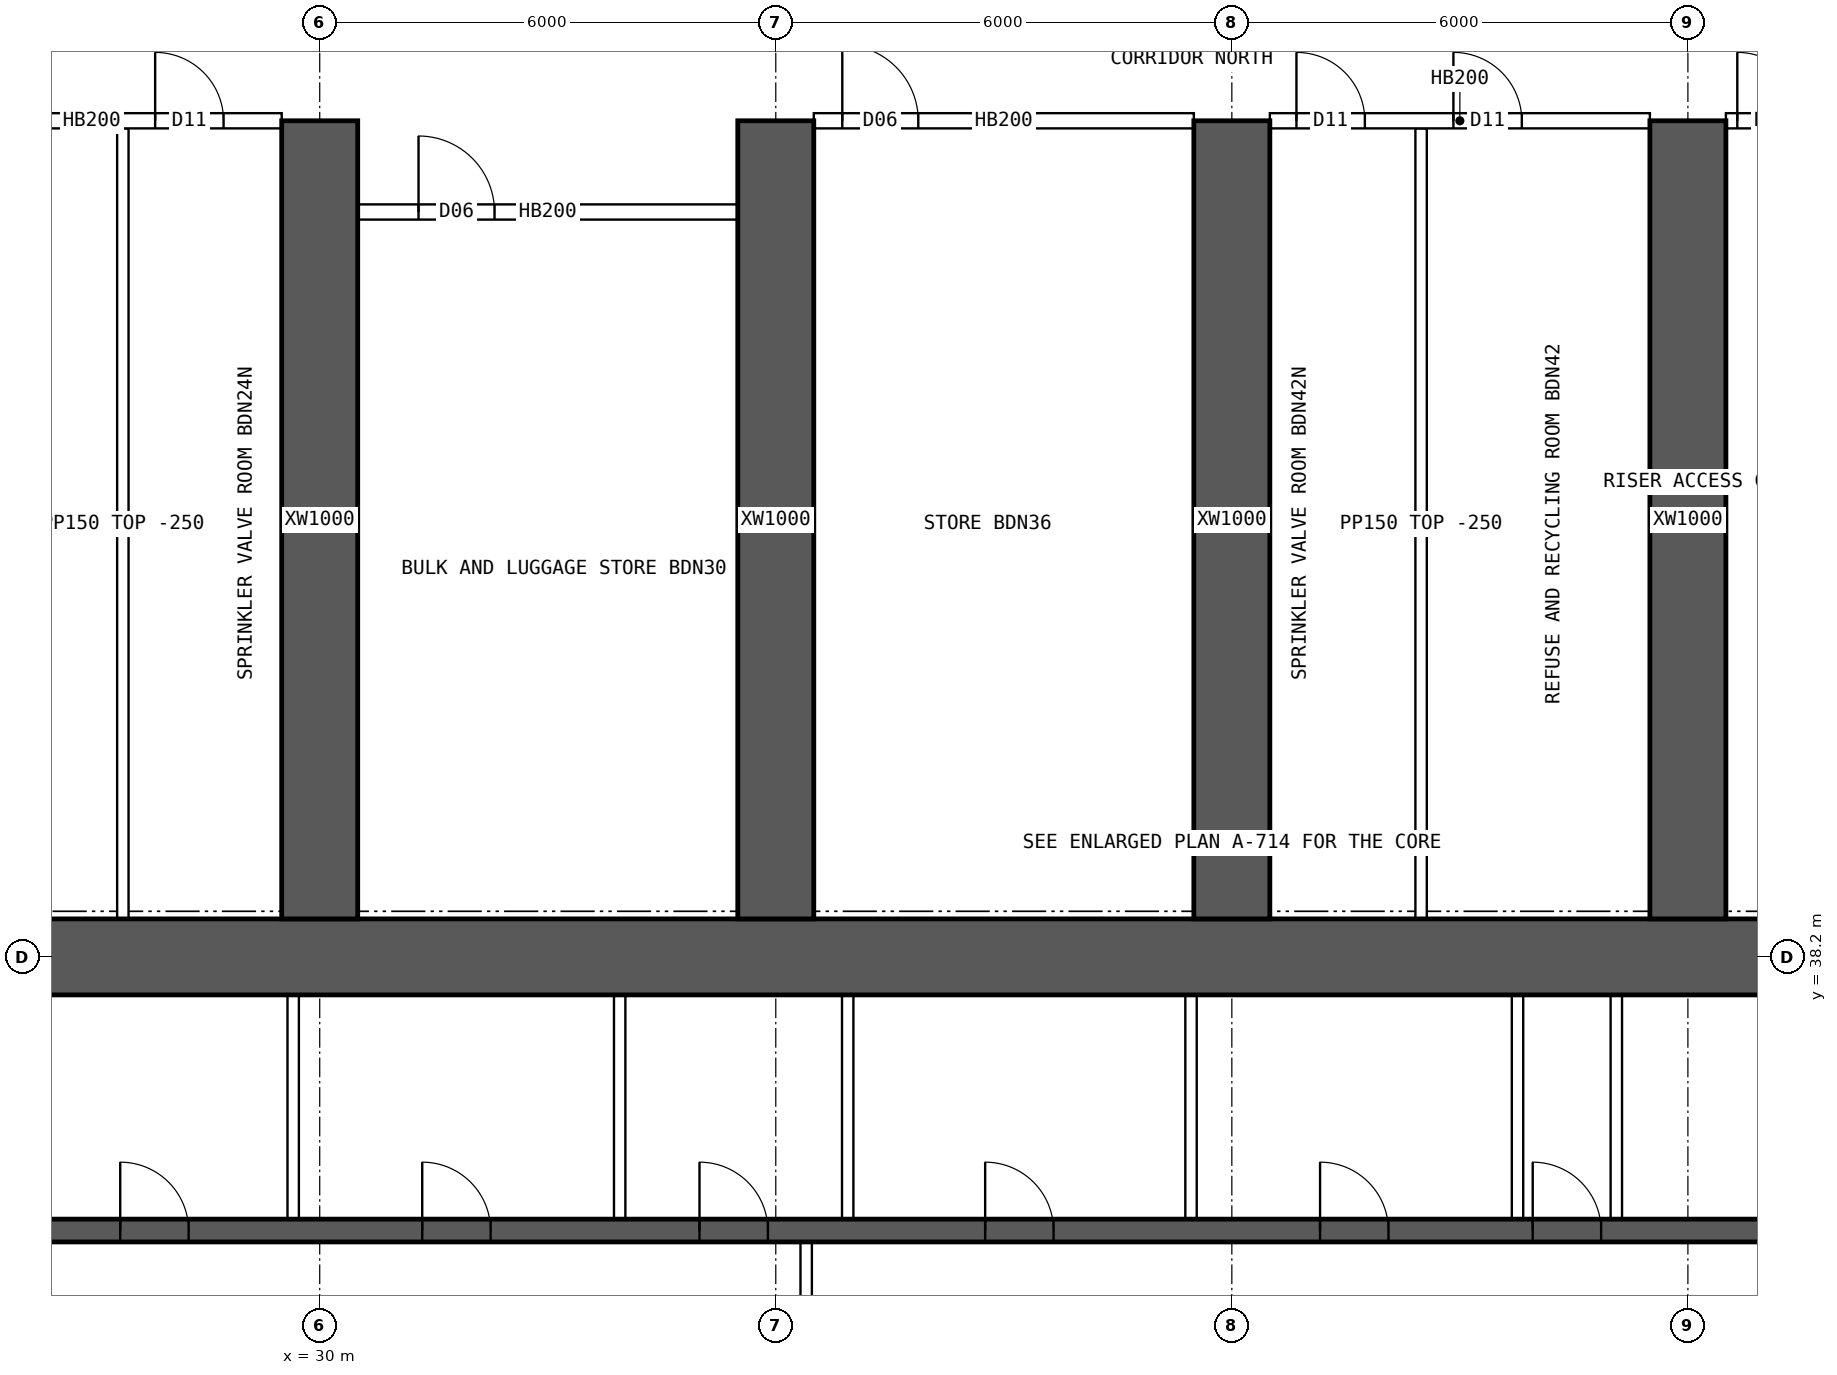
"""IFC4 building model, lengths in metres.
Left out: names, types, materials, properties, quantities, classifications, styles, units other than length and angle.
Written with IfcOpenShell. Run it as: python <this file> out.ifc"""

import sys

from ifc_helpers import new_model, si_unit, direction, frame, frame_2d, origin, place, context, subcontext, project, spatial, rectangle, extrude, element, fill, save


model = new_model("IFC4")
c1 = context("Model", 3, precision=1e-05, world=origin(), true_north=direction((0.0, 1.0)))
c2 = subcontext(c1, "Body", "Model", "MODEL_VIEW")
j1 = project(units=[si_unit("LENGTHUNIT", "METRE"), si_unit("PLANEANGLEUNIT", "RADIAN")], contexts=[c1])
p1 = place(None, origin())
s1 = spatial("IfcSite", under=j1, at=p1, CompositionType="ELEMENT")
p2 = place(p1, origin())
s2 = spatial("IfcBuilding", under=s1, at=p2, CompositionType="ELEMENT")
p3 = place(p2, frame((0.0, 0.0, 46.45)))
s3 = spatial("IfcBuildingStorey", under=s2, at=p3, CompositionType="ELEMENT", Elevation=46.45)
p4 = place(p3, frame((18.0, 38.2, 0.0), z_axis=(0.0, 0.0, 1.0), x_axis=(1.0, 0.0, 0.0)))
e1 = element("IfcWall", 1, at=p4, inside=s3, PredefinedType="SHEAR", context=c2, shape_type="SweptSolid", body=[
    extrude(rectangle(XDim=48.0, YDim=1.0, at=frame_2d((24.0, 0.0))), origin(), (0.0, 0.0, 1.0), 3.75),
])
p5 = place(p3, frame((18.5, 34.6, 0.0), z_axis=(0.0, 0.0, 1.0), x_axis=(1.0, 0.0, 0.0)))
e2 = element("IfcWall", 2, at=p5, inside=s3, PredefinedType="SHEAR", context=c2, shape_type="SweptSolid", body=[
    extrude(rectangle(XDim=47.0, YDim=0.3, at=frame_2d((23.5, 0.0))), origin(), (0.0, 0.0, 1.0), 3.75),
])
p6 = place(p5, frame((0.9, 0.0, 0.0)))
e3 = element("IfcOpeningElement", 3, at=p6, cuts=e2, PredefinedType="OPENING", context=c2, shape_type="SweptSolid", body=[
    extrude(rectangle(XDim=1.1, YDim=2.1, at=frame_2d((0.55, 1.05))), frame((0.0, 0.16, 0.0), z_axis=(0.0, -1.0, 0.0), x_axis=(1.0, 0.0, 0.0)), (0.0, 0.0, 1.0), 0.32),
])
p7 = place(p5, frame((45.0, 0.0, 0.0)))
e4 = element("IfcOpeningElement", 4, at=p7, cuts=e2, PredefinedType="OPENING", context=c2, shape_type="SweptSolid", body=[
    extrude(rectangle(XDim=1.1, YDim=2.1, at=frame_2d((0.55, 1.05))), frame((0.0, 0.16, 0.0), z_axis=(0.0, -1.0, 0.0), x_axis=(1.0, 0.0, 0.0)), (0.0, 0.0, 1.0), 0.32),
])
p8 = place(p5, frame((4.1, 0.0, 0.0)))
e5 = element("IfcOpeningElement", 5, at=p8, cuts=e2, PredefinedType="OPENING", context=c2, shape_type="SweptSolid", body=[
    extrude(rectangle(XDim=0.9, YDim=2.1, at=frame_2d((0.45, 1.05))), frame((0.0, 0.16, 0.0), z_axis=(0.0, -1.0, 0.0), x_axis=(1.0, 0.0, 0.0)), (0.0, 0.0, 1.0), 0.32),
])
p9 = place(p5, frame((42.0, 0.0, 0.0)))
e6 = element("IfcOpeningElement", 6, at=p9, cuts=e2, PredefinedType="OPENING", context=c2, shape_type="SweptSolid", body=[
    extrude(rectangle(XDim=0.9, YDim=2.1, at=frame_2d((0.45, 1.05))), frame((0.0, 0.16, 0.0), z_axis=(0.0, -1.0, 0.0), x_axis=(1.0, 0.0, 0.0)), (0.0, 0.0, 1.0), 0.32),
])
p10 = place(p5, frame((8.875, 0.0, 0.0)))
e7 = element("IfcOpeningElement", 7, at=p10, cuts=e2, PredefinedType="OPENING", context=c2, shape_type="SweptSolid", body=[
    extrude(rectangle(XDim=0.9, YDim=2.1, at=frame_2d((0.45, 1.05))), frame((0.0, 0.16, 0.0), z_axis=(0.0, -1.0, 0.0), x_axis=(1.0, 0.0, 0.0)), (0.0, 0.0, 1.0), 0.32),
])
p11 = place(p5, frame((12.849, 0.0, 0.0)))
e8 = element("IfcOpeningElement", 8, at=p11, cuts=e2, PredefinedType="OPENING", context=c2, shape_type="SweptSolid", body=[
    extrude(rectangle(XDim=0.9, YDim=2.1, at=frame_2d((0.45, 1.05))), frame((0.0, 0.16, 0.0), z_axis=(0.0, -1.0, 0.0), x_axis=(1.0, 0.0, 0.0)), (0.0, 0.0, 1.0), 0.32),
])
p12 = place(p5, frame((16.496, 0.0, 0.0)))
e9 = element("IfcOpeningElement", 9, at=p12, cuts=e2, PredefinedType="OPENING", context=c2, shape_type="SweptSolid", body=[
    extrude(rectangle(XDim=0.9, YDim=2.1, at=frame_2d((0.45, 1.05))), frame((0.0, 0.16, 0.0), z_axis=(0.0, -1.0, 0.0), x_axis=(1.0, 0.0, 0.0)), (0.0, 0.0, 1.0), 0.32),
])
p13 = place(p5, frame((20.255, 0.0, 0.0)))
e10 = element("IfcOpeningElement", 10, at=p13, cuts=e2, PredefinedType="OPENING", context=c2, shape_type="SweptSolid", body=[
    extrude(rectangle(XDim=0.9, YDim=2.1, at=frame_2d((0.45, 1.05))), frame((0.0, 0.16, 0.0), z_axis=(0.0, -1.0, 0.0), x_axis=(1.0, 0.0, 0.0)), (0.0, 0.0, 1.0), 0.32),
])
p14 = place(p5, frame((24.661, 0.0, 0.0)))
e11 = element("IfcOpeningElement", 11, at=p14, cuts=e2, PredefinedType="OPENING", context=c2, shape_type="SweptSolid", body=[
    extrude(rectangle(XDim=0.9, YDim=2.1, at=frame_2d((0.45, 1.05))), frame((0.0, 0.16, 0.0), z_axis=(0.0, -1.0, 0.0), x_axis=(1.0, 0.0, 0.0)), (0.0, 0.0, 1.0), 0.32),
])
p15 = place(p5, frame((27.458, 0.0, 0.0)))
e12 = element("IfcOpeningElement", 12, at=p15, cuts=e2, PredefinedType="OPENING", context=c2, shape_type="SweptSolid", body=[
    extrude(rectangle(XDim=0.9, YDim=2.1, at=frame_2d((0.45, 1.05))), frame((0.0, 0.16, 0.0), z_axis=(0.0, -1.0, 0.0), x_axis=(1.0, 0.0, 0.0)), (0.0, 0.0, 1.0), 0.32),
])
p16 = place(p5, frame((30.641, 0.0, 0.0)))
e13 = element("IfcOpeningElement", 13, at=p16, cuts=e2, PredefinedType="OPENING", context=c2, shape_type="SweptSolid", body=[
    extrude(rectangle(XDim=0.9, YDim=2.1, at=frame_2d((0.45, 1.05))), frame((0.0, 0.16, 0.0), z_axis=(0.0, -1.0, 0.0), x_axis=(1.0, 0.0, 0.0)), (0.0, 0.0, 1.0), 0.32),
])
p17 = place(p5, frame((34.592, 0.0, 0.0)))
e14 = element("IfcOpeningElement", 14, at=p17, cuts=e2, PredefinedType="OPENING", context=c2, shape_type="SweptSolid", body=[
    extrude(rectangle(XDim=0.9, YDim=2.1, at=frame_2d((0.45, 1.05))), frame((0.0, 0.16, 0.0), z_axis=(0.0, -1.0, 0.0), x_axis=(1.0, 0.0, 0.0)), (0.0, 0.0, 1.0), 0.32),
])
p18 = place(p5, frame((37.53, 0.0, 0.0)))
e15 = element("IfcOpeningElement", 15, at=p18, cuts=e2, PredefinedType="OPENING", context=c2, shape_type="SweptSolid", body=[
    extrude(rectangle(XDim=0.9, YDim=2.1, at=frame_2d((0.45, 1.05))), frame((0.0, 0.16, 0.0), z_axis=(0.0, -1.0, 0.0), x_axis=(1.0, 0.0, 0.0)), (0.0, 0.0, 1.0), 0.32),
])
for number, where, z_axis, x_axis in (
    (16, (30.0, 38.7, 0.0), (0.0, 0.0, 1.0), (0.0, 1.0, 0.0)),
    (17, (36.0, 38.7, 0.0), (0.0, 0.0, 1.0), (0.0, 1.0, 0.0)),
    (18, (42.0, 38.7, 0.0), (0.0, 0.0, 1.0), (0.0, 1.0, 0.0)),
    (19, (48.0, 38.7, 0.0), (0.0, 0.0, 1.0), (0.0, 1.0, 0.0)),
):
    element("IfcWall", number, at=place(p3, frame(where, z_axis=z_axis, x_axis=x_axis)), inside=s3, PredefinedType="SHEAR", context=c2, shape_type="SweptSolid", body=[
        extrude(rectangle(XDim=10.5, YDim=1.0, at=frame_2d((5.25, 0.0))), origin(), (0.0, 0.0, 1.0), 3.75),
    ])
p19 = place(p3, frame((36.4, 30.55, 0.0), z_axis=(0.0, 0.0, 1.0), x_axis=(0.0, 1.0, 0.0)))
e20 = element("IfcWall", 20, at=p19, inside=s3, PredefinedType="SOLIDWALL", context=c2, shape_type="SweptSolid", body=[
    extrude(rectangle(XDim=3.9, YDim=0.15, at=frame_2d((1.95, 0.0))), origin(), (0.0, 0.0, 1.0), 3.5),
])
p20 = place(p19, frame((1.15, 0.0, 0.0)))
e21 = element("IfcOpeningElement", 21, at=p20, cuts=e20, PredefinedType="OPENING", context=c2, shape_type="SweptSolid", body=[
    extrude(rectangle(XDim=1.6, YDim=2.1, at=frame_2d((0.8, 1.05))), frame((0.0, 0.085, 0.0), z_axis=(0.0, -1.0, 0.0), x_axis=(1.0, 0.0, 0.0)), (0.0, 0.0, 1.0), 0.17),
])
for number, where, z_axis, x_axis in (
    (22, (29.651, 34.75, 0.0), (0.0, 0.0, 1.0), (0.0, 1.0, 0.0)),
    (23, (33.946, 34.75, 0.0), (0.0, 0.0, 1.0), (0.0, 1.0, 0.0)),
    (24, (36.946, 34.75, 0.0), (0.0, 0.0, 1.0), (0.0, 1.0, 0.0)),
    (25, (41.463, 34.75, 0.0), (0.0, 0.0, 1.0), (0.0, 1.0, 0.0)),
    (26, (45.758, 34.75, 0.0), (0.0, 0.0, 1.0), (0.0, 1.0, 0.0)),
    (27, (47.058, 34.75, 0.0), (0.0, 0.0, 1.0), (0.0, 1.0, 0.0)),
):
    element("IfcWall", number, at=place(p3, frame(where, z_axis=z_axis, x_axis=x_axis)), inside=s3, PredefinedType="SOLIDWALL", context=c2, shape_type="SweptSolid", body=[
        extrude(rectangle(XDim=2.95, YDim=0.15, at=frame_2d((1.475, 0.0))), origin(), (0.0, 0.0, 1.0), 3.5),
    ])
p21 = place(p3, frame((24.5, 49.2, 0.0), z_axis=(0.0, 0.0, 1.0), x_axis=(1.0, 0.0, 0.0)))
e28 = element("IfcWall", 28, at=p21, inside=s3, PredefinedType="SOLIDWALL", context=c2, shape_type="SweptSolid", body=[
    extrude(rectangle(XDim=5.0, YDim=0.2, at=frame_2d((2.5, 0.0))), origin(), (0.0, 0.0, 1.0), 3.5),
])
p22 = place(p21, frame((0.15, 0.0, 0.0)))
e29 = element("IfcOpeningElement", 29, at=p22, cuts=e28, PredefinedType="OPENING", context=c2, shape_type="SweptSolid", body=[
    extrude(rectangle(XDim=0.9, YDim=2.1, at=frame_2d((0.45, 1.05))), frame((0.0, 0.11, 0.0), z_axis=(0.0, -1.0, 0.0), x_axis=(1.0, 0.0, 0.0)), (0.0, 0.0, 1.0), 0.22),
])
p23 = place(p21, frame((3.335, 0.0, 0.0)))
e30 = element("IfcOpeningElement", 30, at=p23, cuts=e28, PredefinedType="OPENING", context=c2, shape_type="SweptSolid", body=[
    extrude(rectangle(XDim=0.9, YDim=2.1, at=frame_2d((0.45, 1.05))), frame((0.0, 0.11, 0.0), z_axis=(0.0, -1.0, 0.0), x_axis=(1.0, 0.0, 0.0)), (0.0, 0.0, 1.0), 0.22),
])
p24 = place(p3, frame((36.5, 49.2, 0.0), z_axis=(0.0, 0.0, 1.0), x_axis=(1.0, 0.0, 0.0)))
e31 = element("IfcWall", 31, at=p24, inside=s3, PredefinedType="SOLIDWALL", context=c2, shape_type="SweptSolid", body=[
    extrude(rectangle(XDim=5.0, YDim=0.2, at=frame_2d((2.5, 0.0))), origin(), (0.0, 0.0, 1.0), 3.5),
])
p25 = place(p24, frame((0.375, 0.0, 0.0)))
e32 = element("IfcOpeningElement", 32, at=p25, cuts=e31, PredefinedType="OPENING", context=c2, shape_type="SweptSolid", body=[
    extrude(rectangle(XDim=1.0, YDim=2.1, at=frame_2d((0.5, 1.05))), frame((0.0, 0.11, 0.0), z_axis=(0.0, -1.0, 0.0), x_axis=(1.0, 0.0, 0.0)), (0.0, 0.0, 1.0), 0.22),
])
p26 = place(p3, frame((42.5, 49.2, 0.0), z_axis=(0.0, 0.0, 1.0), x_axis=(1.0, 0.0, 0.0)))
e33 = element("IfcWall", 33, at=p26, inside=s3, PredefinedType="SOLIDWALL", context=c2, shape_type="SweptSolid", body=[
    extrude(rectangle(XDim=5.0, YDim=0.2, at=frame_2d((2.5, 0.0))), origin(), (0.0, 0.0, 1.0), 3.5),
])
p27 = place(p26, frame((0.35, 0.0, 0.0)))
e34 = element("IfcOpeningElement", 34, at=p27, cuts=e33, PredefinedType="OPENING", context=c2, shape_type="SweptSolid", body=[
    extrude(rectangle(XDim=0.9, YDim=2.1, at=frame_2d((0.45, 1.05))), frame((0.0, 0.11, 0.0), z_axis=(0.0, -1.0, 0.0), x_axis=(1.0, 0.0, 0.0)), (0.0, 0.0, 1.0), 0.22),
])
p28 = place(p26, frame((2.415, 0.0, 0.0)))
e35 = element("IfcOpeningElement", 35, at=p28, cuts=e33, PredefinedType="OPENING", context=c2, shape_type="SweptSolid", body=[
    extrude(rectangle(XDim=0.9, YDim=2.1, at=frame_2d((0.45, 1.05))), frame((0.0, 0.11, 0.0), z_axis=(0.0, -1.0, 0.0), x_axis=(1.0, 0.0, 0.0)), (0.0, 0.0, 1.0), 0.22),
])
p29 = place(p3, frame((48.5, 49.2, 0.0), z_axis=(0.0, 0.0, 1.0), x_axis=(1.0, 0.0, 0.0)))
e36 = element("IfcWall", 36, at=p29, inside=s3, PredefinedType="SOLIDWALL", context=c2, shape_type="SweptSolid", body=[
    extrude(rectangle(XDim=5.0, YDim=0.2, at=frame_2d((2.5, 0.0))), origin(), (0.0, 0.0, 1.0), 3.5),
])
p30 = place(p29, frame((0.15, 0.0, 0.0)))
e37 = element("IfcOpeningElement", 37, at=p30, cuts=e36, PredefinedType="OPENING", context=c2, shape_type="SweptSolid", body=[
    extrude(rectangle(XDim=0.9, YDim=2.1, at=frame_2d((0.45, 1.05))), frame((0.0, 0.11, 0.0), z_axis=(0.0, -1.0, 0.0), x_axis=(1.0, 0.0, 0.0)), (0.0, 0.0, 1.0), 0.22),
])
p31 = place(p29, frame((1.98, 0.0, 0.0)))
e38 = element("IfcOpeningElement", 38, at=p31, cuts=e36, PredefinedType="OPENING", context=c2, shape_type="SweptSolid", body=[
    extrude(rectangle(XDim=0.9, YDim=2.1, at=frame_2d((0.45, 1.05))), frame((0.0, 0.11, 0.0), z_axis=(0.0, -1.0, 0.0), x_axis=(1.0, 0.0, 0.0)), (0.0, 0.0, 1.0), 0.22),
])
p32 = place(p3, frame((27.41, 38.7, 0.0), z_axis=(0.0, 0.0, 1.0), x_axis=(0.0, 1.0, 0.0)))
e39 = element("IfcWall", 39, at=p32, inside=s3, PredefinedType="PARTITIONING", context=c2, shape_type="SweptSolid", body=[
    extrude(rectangle(XDim=10.4, YDim=0.15, at=frame_2d((5.2, 0.0))), origin(), (0.0, 0.0, 1.0), 3.5),
])
p33 = place(p3, frame((30.5, 48.0, 0.0), z_axis=(0.0, 0.0, 1.0), x_axis=(1.0, 0.0, 0.0)))
e40 = element("IfcWall", 40, at=p33, inside=s3, PredefinedType="SOLIDWALL", context=c2, shape_type="SweptSolid", body=[
    extrude(rectangle(XDim=5.0, YDim=0.2, at=frame_2d((2.5, 0.0))), origin(), (0.0, 0.0, 1.0), 3.5),
])
p34 = place(p33, frame((0.8, 0.0, 0.0)))
e41 = element("IfcOpeningElement", 41, at=p34, cuts=e40, PredefinedType="OPENING", context=c2, shape_type="SweptSolid", body=[
    extrude(rectangle(XDim=1.0, YDim=2.1, at=frame_2d((0.5, 1.05))), frame((0.0, 0.11, 0.0), z_axis=(0.0, -1.0, 0.0), x_axis=(1.0, 0.0, 0.0)), (0.0, 0.0, 1.0), 0.22),
])
p35 = place(p3, frame((44.49, 38.7, 0.0), z_axis=(0.0, 0.0, 1.0), x_axis=(0.0, 1.0, 0.0)))
e42 = element("IfcWall", 42, at=p35, inside=s3, PredefinedType="PARTITIONING", context=c2, shape_type="SweptSolid", body=[
    extrude(rectangle(XDim=10.4, YDim=0.15, at=frame_2d((5.2, 0.0))), origin(), (0.0, 0.0, 1.0), 3.5),
])
p36 = place(p10, origin())
e43 = element("IfcDoor", 43, at=p36, inside=s3, OperationType="SINGLE_SWING_LEFT", PredefinedType="DOOR", context=c2, shape_type="SweptSolid", body=[
    extrude(rectangle(XDim=0.9, YDim=2.1, at=frame_2d((0.45, 1.05))), frame((0.0, 0.025, 0.0), z_axis=(0.0, -1.0, 0.0), x_axis=(1.0, 0.0, 0.0)), (0.0, 0.0, 1.0), 0.05),
])
fill(e7, e43)
p37 = place(p11, origin())
e44 = element("IfcDoor", 44, at=p37, inside=s3, OperationType="SINGLE_SWING_LEFT", PredefinedType="DOOR", context=c2, shape_type="SweptSolid", body=[
    extrude(rectangle(XDim=0.9, YDim=2.1, at=frame_2d((0.45, 1.05))), frame((0.0, 0.025, 0.0), z_axis=(0.0, -1.0, 0.0), x_axis=(1.0, 0.0, 0.0)), (0.0, 0.0, 1.0), 0.05),
])
fill(e8, e44)
p38 = place(p12, origin())
e45 = element("IfcDoor", 45, at=p38, inside=s3, OperationType="SINGLE_SWING_LEFT", PredefinedType="DOOR", context=c2, shape_type="SweptSolid", body=[
    extrude(rectangle(XDim=0.9, YDim=2.1, at=frame_2d((0.45, 1.05))), frame((0.0, 0.025, 0.0), z_axis=(0.0, -1.0, 0.0), x_axis=(1.0, 0.0, 0.0)), (0.0, 0.0, 1.0), 0.05),
])
fill(e9, e45)
p39 = place(p13, origin())
e46 = element("IfcDoor", 46, at=p39, inside=s3, OperationType="SINGLE_SWING_LEFT", PredefinedType="DOOR", context=c2, shape_type="SweptSolid", body=[
    extrude(rectangle(XDim=0.9, YDim=2.1, at=frame_2d((0.45, 1.05))), frame((0.0, 0.025, 0.0), z_axis=(0.0, -1.0, 0.0), x_axis=(1.0, 0.0, 0.0)), (0.0, 0.0, 1.0), 0.05),
])
fill(e10, e46)
p40 = place(p14, origin())
e47 = element("IfcDoor", 47, at=p40, inside=s3, OperationType="SINGLE_SWING_LEFT", PredefinedType="DOOR", context=c2, shape_type="SweptSolid", body=[
    extrude(rectangle(XDim=0.9, YDim=2.1, at=frame_2d((0.45, 1.05))), frame((0.0, 0.025, 0.0), z_axis=(0.0, -1.0, 0.0), x_axis=(1.0, 0.0, 0.0)), (0.0, 0.0, 1.0), 0.05),
])
fill(e11, e47)
p41 = place(p15, origin())
e48 = element("IfcDoor", 48, at=p41, inside=s3, OperationType="SINGLE_SWING_LEFT", PredefinedType="DOOR", context=c2, shape_type="SweptSolid", body=[
    extrude(rectangle(XDim=0.9, YDim=2.1, at=frame_2d((0.45, 1.05))), frame((0.0, 0.025, 0.0), z_axis=(0.0, -1.0, 0.0), x_axis=(1.0, 0.0, 0.0)), (0.0, 0.0, 1.0), 0.05),
])
fill(e12, e48)
p42 = place(p23, origin())
e49 = element("IfcDoor", 49, at=p42, inside=s3, OperationType="SINGLE_SWING_LEFT", PredefinedType="DOOR", context=c2, shape_type="SweptSolid", body=[
    extrude(rectangle(XDim=0.9, YDim=2.1, at=frame_2d((0.45, 1.05))), frame((0.0, 0.025, 0.0), z_axis=(0.0, -1.0, 0.0), x_axis=(1.0, 0.0, 0.0)), (0.0, 0.0, 1.0), 0.05),
])
fill(e30, e49)
p43 = place(p34, origin())
e50 = element("IfcDoor", 50, at=p43, inside=s3, OperationType="SINGLE_SWING_LEFT", PredefinedType="DOOR", context=c2, shape_type="SweptSolid", body=[
    extrude(rectangle(XDim=1.0, YDim=2.1, at=frame_2d((0.5, 1.05))), frame((0.0, 0.025, 0.0), z_axis=(0.0, -1.0, 0.0), x_axis=(1.0, 0.0, 0.0)), (0.0, 0.0, 1.0), 0.05),
])
fill(e41, e50)
p44 = place(p25, origin())
e51 = element("IfcDoor", 51, at=p44, inside=s3, OperationType="SINGLE_SWING_LEFT", PredefinedType="DOOR", context=c2, shape_type="SweptSolid", body=[
    extrude(rectangle(XDim=1.0, YDim=2.1, at=frame_2d((0.5, 1.05))), frame((0.0, 0.025, 0.0), z_axis=(0.0, -1.0, 0.0), x_axis=(1.0, 0.0, 0.0)), (0.0, 0.0, 1.0), 0.05),
])
fill(e32, e51)
p45 = place(p27, origin())
e52 = element("IfcDoor", 52, at=p45, inside=s3, OperationType="SINGLE_SWING_LEFT", PredefinedType="DOOR", context=c2, shape_type="SweptSolid", body=[
    extrude(rectangle(XDim=0.9, YDim=2.1, at=frame_2d((0.45, 1.05))), frame((0.0, 0.025, 0.0), z_axis=(0.0, -1.0, 0.0), x_axis=(1.0, 0.0, 0.0)), (0.0, 0.0, 1.0), 0.05),
])
fill(e34, e52)
p46 = place(p28, origin())
e53 = element("IfcDoor", 53, at=p46, inside=s3, OperationType="SINGLE_SWING_LEFT", PredefinedType="DOOR", context=c2, shape_type="SweptSolid", body=[
    extrude(rectangle(XDim=0.9, YDim=2.1, at=frame_2d((0.45, 1.05))), frame((0.0, 0.025, 0.0), z_axis=(0.0, -1.0, 0.0), x_axis=(1.0, 0.0, 0.0)), (0.0, 0.0, 1.0), 0.05),
])
fill(e35, e53)
p47 = place(p30, origin())
e54 = element("IfcDoor", 54, at=p47, inside=s3, OperationType="SINGLE_SWING_LEFT", PredefinedType="DOOR", context=c2, shape_type="SweptSolid", body=[
    extrude(rectangle(XDim=0.9, YDim=2.1, at=frame_2d((0.45, 1.05))), frame((0.0, 0.025, 0.0), z_axis=(0.0, -1.0, 0.0), x_axis=(1.0, 0.0, 0.0)), (0.0, 0.0, 1.0), 0.05),
])
fill(e37, e54)
save(model, sys.argv[1])
